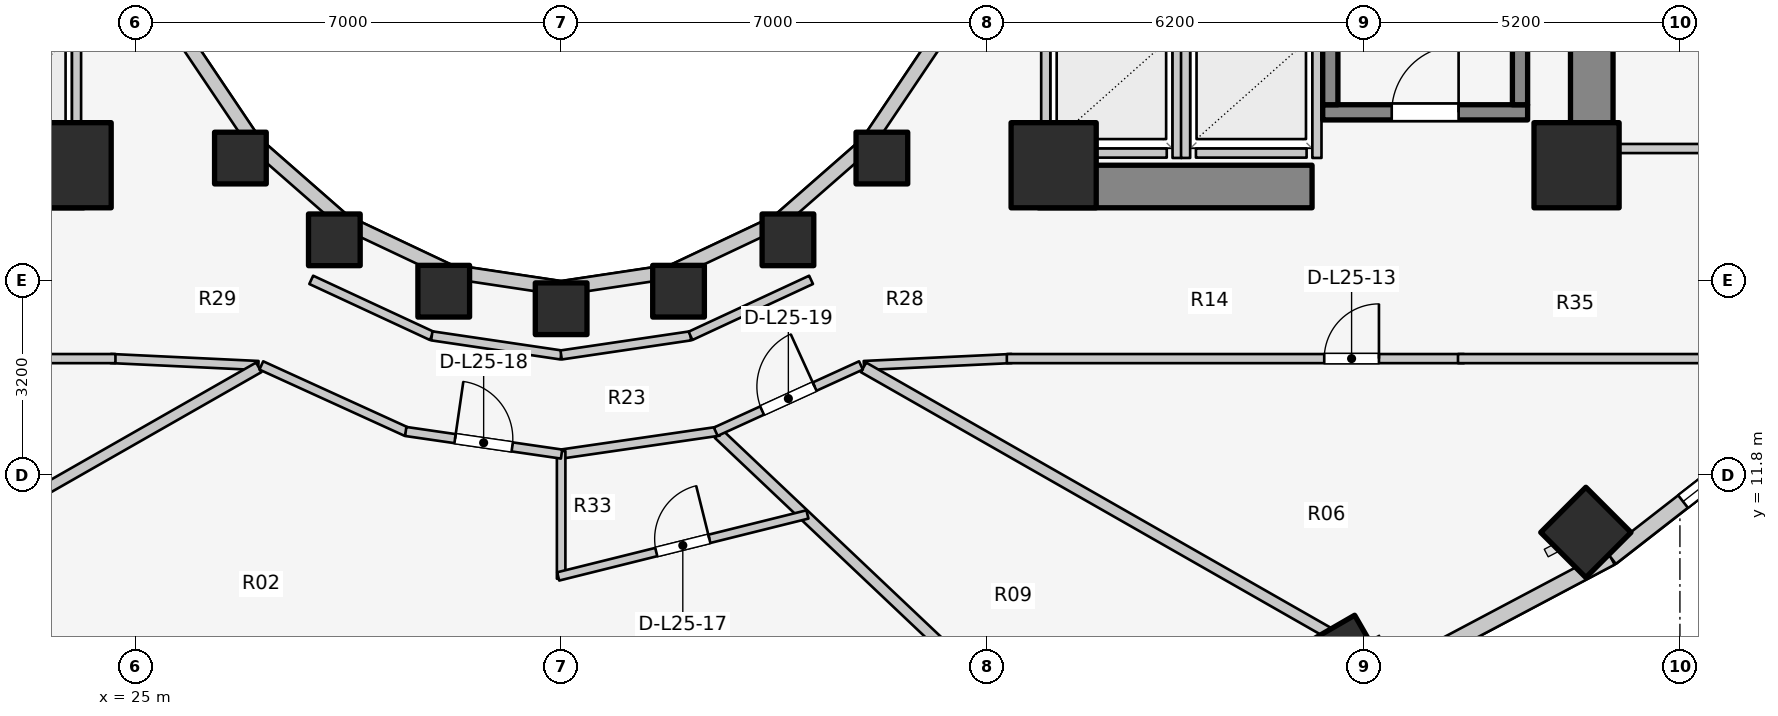
"""IFC4 building model, lengths in metres.
Left out: names, types, materials, properties, quantities, classifications, styles, units other than length and angle.
Written with IfcOpenShell. Run it as: python <this file> out.ifc"""

import sys

from ifc_helpers import new_model, si_unit, direction, frame, frame_2d, origin, origin_2d, place, context, subcontext, project, spatial, rectangle, extrude, element, fill, save


model = new_model("IFC4")
c1 = context("Model", 3, precision=1e-05, world=origin(), true_north=direction((0.0, 1.0)))
c2 = subcontext(c1, "Body", "Model", "MODEL_VIEW")
j1 = project(units=[si_unit("LENGTHUNIT", "METRE"), si_unit("PLANEANGLEUNIT", "RADIAN")], contexts=[c1])
p1 = place(None, origin())
s1 = spatial("IfcSite", under=j1, at=p1, CompositionType="ELEMENT")
p2 = place(p1, origin())
s2 = spatial("IfcBuilding", under=s1, at=p2, CompositionType="ELEMENT")
p3 = place(p2, frame((0.0, 0.0, 85.6)))
s3 = spatial("IfcBuildingStorey", under=s2, at=p3, CompositionType="ELEMENT", Elevation=85.6)
p4 = place(p3, frame((19.65, 16.55, 0.0), z_axis=(0.0, 0.0, 1.0), x_axis=(1.0, 0.0, 0.0)))
e1 = element("IfcWall", 1, at=p4, inside=s3, PredefinedType="SHEAR", context=c2, shape_type="SweptSolid", body=[
    extrude(rectangle(XDim=4.5, YDim=0.7, at=frame_2d((2.25, 0.0))), origin(), (0.0, 0.0, 1.0), 3.1),
])
p5 = place(p3, frame((48.95, 17.05, 0.0), z_axis=(0.0, 0.0, 1.0), x_axis=(0.0, 1.0, 0.0)))
e2 = element("IfcWall", 2, at=p5, inside=s3, PredefinedType="SHEAR", context=c2, shape_type="SweptSolid", body=[
    extrude(rectangle(XDim=12.8, YDim=0.7, at=frame_2d((6.4, 0.0))), origin(), (0.0, 0.0, 1.0), 3.1),
])
p6 = place(p3, frame((39.85, 16.55, 0.0), z_axis=(0.0, 0.0, 1.0), x_axis=(1.0, 0.0, 0.0)))
e3 = element("IfcWall", 3, at=p6, inside=s3, PredefinedType="SHEAR", context=c2, shape_type="SweptSolid", body=[
    extrude(rectangle(XDim=4.5, YDim=0.7, at=frame_2d((2.25, 0.0))), origin(), (0.0, 0.0, 1.0), 3.1),
])
p7 = place(p3, frame((44.525, 17.77, 0.0), z_axis=(0.0, 0.0, 1.0), x_axis=(1.0, 0.0, 0.0)))
e4 = element("IfcWall", 4, at=p7, inside=s3, PredefinedType="SOLIDWALL", context=c2, shape_type="SweptSolid", body=[
    extrude(rectangle(XDim=3.37, YDim=0.25, at=frame_2d((1.685, 0.0))), origin(), (0.0, 0.0, 1.0), 3.1),
])
p8 = place(p7, frame((1.135, 0.0, 0.0)))
e5 = element("IfcOpeningElement", 5, at=p8, cuts=e4, PredefinedType="OPENING", context=c2, shape_type="SweptSolid", body=[
    extrude(rectangle(XDim=1.1, YDim=2.1, at=frame_2d((0.55, 1.05))), frame((0.0, 0.135, 0.0), z_axis=(0.0, -1.0, 0.0), x_axis=(1.0, 0.0, 0.0)), (0.0, 0.0, 1.0), 0.27),
])
for number, where, z_axis, x_axis in (
    (6, (44.65, 17.895, 0.0), (0.0, 0.0, 1.0), (0.0, 1.0, 0.0)),
    (7, (47.77, 17.895, 0.0), (0.0, 0.0, 1.0), (0.0, 1.0, 0.0)),
):
    element("IfcWall", number, at=place(p3, frame(where, z_axis=z_axis, x_axis=x_axis)), inside=s3, PredefinedType="SOLIDWALL", context=c2, shape_type="SweptSolid", body=[
        extrude(rectangle(XDim=7.81, YDim=0.25, at=frame_2d((3.905, 0.0))), origin(), (0.0, 0.0, 1.0), 3.1),
    ])
for number, where, z_axis, x_axis in (
    (8, (23.9, 16.9, 0.0), (0.0, 0.0, 1.0), (1.0, 0.0, 0.0)),
    (9, (40.1, 16.9, 0.0), (0.0, 0.0, 1.0), (1.0, 0.0, 0.0)),
    (10, (48.7, 16.9, 0.0), (0.0, 0.0, 1.0), (1.0, 0.0, 0.0)),
):
    element("IfcColumn", number, at=place(p3, frame(where, z_axis=z_axis, x_axis=x_axis)), inside=s3, PredefinedType="COLUMN", context=c2, shape_type="SweptSolid", body=[
        extrude(rectangle(XDim=1.4, YDim=1.4, at=origin_2d()), origin(), (0.0, 0.0, 1.0), 3.1),
    ])
for number, where, z_axis, x_axis in (
    (11, (26.725, 17.018, 0.0), (0.0, 0.0, 1.0), (1.0, 0.0, 0.0)),
    (12, (28.27, 15.673, 0.0), (0.0, 0.0, 1.0), (1.0, 0.0, 0.0)),
    (13, (30.069, 14.828, 0.0), (0.0, 0.0, 1.0), (1.0, 0.0, 0.0)),
    (14, (32.0, 14.54, 0.0), (0.0, 0.0, 1.0), (1.0, 0.0, 0.0)),
    (15, (33.931, 14.828, 0.0), (0.0, 0.0, 1.0), (1.0, 0.0, 0.0)),
    (16, (35.73, 15.673, 0.0), (0.0, 0.0, 1.0), (1.0, 0.0, 0.0)),
):
    element("IfcColumn", number, at=place(p3, frame(where, z_axis=z_axis, x_axis=x_axis)), inside=s3, PredefinedType="COLUMN", context=c2, shape_type="SweptSolid", body=[
        extrude(rectangle(XDim=0.85, YDim=0.85, at=origin_2d()), origin(), (0.0, 0.0, 1.0), 3.1),
    ])
p9 = place(p3, frame((44.858, 8.782, 0.0), z_axis=(0.0, 0.0, 1.0), x_axis=(0.5, -0.866025403784, 0.0)))
e17 = element("IfcColumn", 17, at=p9, inside=s3, PredefinedType="COLUMN", context=c2, shape_type="SweptSolid", body=[
    extrude(rectangle(XDim=1.05, YDim=1.05, at=origin_2d()), origin(), (0.0, 0.0, 1.0), 3.1),
])
p10 = place(p3, frame((37.275, 17.018, 0.0), z_axis=(0.0, 0.0, 1.0), x_axis=(1.0, 0.0, 0.0)))
e18 = element("IfcColumn", 18, at=p10, inside=s3, PredefinedType="COLUMN", context=c2, shape_type="SweptSolid", body=[
    extrude(rectangle(XDim=0.85, YDim=0.85, at=origin_2d()), origin(), (0.0, 0.0, 1.0), 3.1),
])
p11 = place(p3, frame((48.853, 10.862, 0.0), z_axis=(0.0, 0.0, 1.0), x_axis=(0.707106781187, -0.707106781187, 0.0)))
e19 = element("IfcColumn", 19, at=p11, inside=s3, PredefinedType="COLUMN", context=c2, shape_type="SweptSolid", body=[
    extrude(rectangle(XDim=1.05, YDim=1.05, at=origin_2d()), origin(), (0.0, 0.0, 1.0), 3.1),
])
p12 = place(p3, frame((25.834, 18.94, 0.0), z_axis=(0.0, 0.0, 1.0), x_axis=(0.558197800898, -0.829707909492, 0.0)))
e20 = element("IfcWall", 20, at=p12, inside=s3, PredefinedType="STANDARD", context=c2, shape_type="SweptSolid", body=[
    extrude(rectangle(XDim=2.027, YDim=0.23, at=frame_2d((1.013, 0.0))), origin(), (0.0, 0.0, 1.0), 2.16),
])
p13 = place(p3, frame((26.965, 17.258, 0.0), z_axis=(0.0, 0.0, 1.0), x_axis=(0.752576694707, -0.658504607869, 0.0)))
e21 = element("IfcWall", 21, at=p13, inside=s3, PredefinedType="STANDARD", context=c2, shape_type="SweptSolid", body=[
    extrude(rectangle(XDim=1.959, YDim=0.23, at=frame_2d((0.98, 0.0))), origin(), (0.0, 0.0, 1.0), 2.16),
])
p14 = place(p3, frame((28.44, 15.968, 0.0), z_axis=(0.0, 0.0, 1.0), x_axis=(0.904179699603, -0.427152280606, 0.0)))
e22 = element("IfcWall", 22, at=p14, inside=s3, PredefinedType="STANDARD", context=c2, shape_type="SweptSolid", body=[
    extrude(rectangle(XDim=1.899, YDim=0.23, at=frame_2d((0.95, 0.0))), origin(), (0.0, 0.0, 1.0), 2.16),
])
for number, where, z_axis, x_axis in (
    (23, (30.157, 15.157, 0.0), (0.0, 0.0, 1.0), (0.989, -0.149, 0.0)),
    (24, (32.0, 14.88, 0.0), (0.0, 0.0, 1.0), (0.989, 0.149, 0.0)),
):
    element("IfcWall", number, at=place(p3, frame(where, z_axis=z_axis, x_axis=x_axis)), inside=s3, PredefinedType="STANDARD", context=c2, shape_type="SweptSolid", body=[
        extrude(rectangle(XDim=1.864, YDim=0.23, at=frame_2d((0.932, 0.0))), origin(), (0.0, 0.0, 1.0), 2.16),
    ])
p15 = place(p3, frame((33.843, 15.157, 0.0), z_axis=(0.0, 0.0, 1.0), x_axis=(0.904179699603, 0.427152280606, 0.0)))
e25 = element("IfcWall", 25, at=p15, inside=s3, PredefinedType="STANDARD", context=c2, shape_type="SweptSolid", body=[
    extrude(rectangle(XDim=1.899, YDim=0.23, at=frame_2d((0.95, 0.0))), origin(), (0.0, 0.0, 1.0), 2.16),
])
p16 = place(p3, frame((35.56, 15.968, 0.0), z_axis=(0.0, 0.0, 1.0), x_axis=(0.752576694707, 0.658504607869, 0.0)))
e26 = element("IfcWall", 26, at=p16, inside=s3, PredefinedType="STANDARD", context=c2, shape_type="SweptSolid", body=[
    extrude(rectangle(XDim=1.959, YDim=0.23, at=frame_2d((0.98, 0.0))), origin(), (0.0, 0.0, 1.0), 2.16),
])
p17 = place(p3, frame((37.035, 17.258, 0.0), z_axis=(0.0, 0.0, 1.0), x_axis=(0.558197800898, 0.829707909492, 0.0)))
e27 = element("IfcWall", 27, at=p17, inside=s3, PredefinedType="STANDARD", context=c2, shape_type="SweptSolid", body=[
    extrude(rectangle(XDim=2.027, YDim=0.23, at=frame_2d((1.013, 0.0))), origin(), (0.0, 0.0, 1.0), 2.16),
])
p18 = place(p3, frame((45.173, 8.279, 0.0), z_axis=(0.0, 0.0, 1.0), x_axis=(0.883668636807, 0.4681129568, 0.0)))
e28 = element("IfcWall", 28, at=p18, inside=s3, PredefinedType="STANDARD", context=c2, shape_type="SweptSolid", body=[
    extrude(rectangle(XDim=4.631, YDim=0.26, at=frame_2d((2.316, 0.0))), origin(), (0.0, 0.0, 1.0), 2.85),
])
p19 = place(p3, frame((49.266, 10.447, 0.0), z_axis=(0.0, 0.0, 1.0), x_axis=(0.789127449954, 0.614229491094, 0.0)))
e29 = element("IfcWall", 29, at=p19, inside=s3, PredefinedType="STANDARD", context=c2, shape_type="SweptSolid", body=[
    extrude(rectangle(XDim=4.505, YDim=0.26, at=frame_2d((2.252, 0.0))), origin(), (0.0, 0.0, 1.0), 2.85),
])
p20 = place(p19, frame((1.502, 0.0, 0.75)))
e30 = element("IfcOpeningElement", 30, at=p20, cuts=e29, PredefinedType="OPENING", context=c2, shape_type="SweptSolid", body=[
    extrude(rectangle(XDim=1.5, YDim=1.6, at=frame_2d((0.75, 0.8))), frame((0.0, 0.14, 0.0), z_axis=(0.0, -1.0, 0.0), x_axis=(1.0, 0.0, 0.0)), (0.0, 0.0, 1.0), 0.28),
])
p21 = place(p3, frame((22.04, 17.1, 0.0), z_axis=(0.0, 0.0, 1.0), x_axis=(1.0, 0.0, 0.0)))
e31 = element("IfcWall", 31, at=p21, inside=s3, PredefinedType="SOLIDWALL", context=c2, shape_type="SweptSolid", body=[
    extrude(rectangle(XDim=1.82, YDim=0.15, at=frame_2d((0.91, 0.0))), origin(), (0.0, 0.0, 1.0), 2.12),
])
p22 = place(p3, frame((24.03, 17.02, 0.0), z_axis=(0.0, 0.0, 1.0), x_axis=(0.0, 1.0, 0.0)))
e32 = element("IfcWall", 32, at=p22, inside=s3, PredefinedType="SOLIDWALL", context=c2, shape_type="SweptSolid", body=[
    extrude(rectangle(XDim=2.22, YDim=0.15, at=frame_2d((1.11, 0.0))), origin(), (0.0, 0.0, 1.0), 2.12),
])
p23 = place(p3, frame((40.14, 17.1, 0.0), z_axis=(0.0, 0.0, 1.0), x_axis=(1.0, 0.0, 0.0)))
e33 = element("IfcWall", 33, at=p23, inside=s3, PredefinedType="SOLIDWALL", context=c2, shape_type="SweptSolid", body=[
    extrude(rectangle(XDim=1.82, YDim=0.15, at=frame_2d((0.91, 0.0))), origin(), (0.0, 0.0, 1.0), 2.12),
])
p24 = place(p3, frame((39.97, 17.02, 0.0), z_axis=(0.0, 0.0, 1.0), x_axis=(0.0, 1.0, 0.0)))
e34 = element("IfcWall", 34, at=p24, inside=s3, PredefinedType="SOLIDWALL", context=c2, shape_type="SweptSolid", body=[
    extrude(rectangle(XDim=2.22, YDim=0.15, at=frame_2d((1.11, 0.0))), origin(), (0.0, 0.0, 1.0), 2.12),
])
p25 = place(p3, frame((42.13, 17.02, 0.0), z_axis=(0.0, 0.0, 1.0), x_axis=(0.0, 1.0, 0.0)))
e35 = element("IfcWall", 35, at=p25, inside=s3, PredefinedType="SOLIDWALL", context=c2, shape_type="SweptSolid", body=[
    extrude(rectangle(XDim=2.22, YDim=0.15, at=frame_2d((1.11, 0.0))), origin(), (0.0, 0.0, 1.0), 2.855),
])
p26 = place(p3, frame((42.44, 17.1, 0.0), z_axis=(0.0, 0.0, 1.0), x_axis=(1.0, 0.0, 0.0)))
e36 = element("IfcWall", 36, at=p26, inside=s3, PredefinedType="SOLIDWALL", context=c2, shape_type="SweptSolid", body=[
    extrude(rectangle(XDim=1.82, YDim=0.15, at=frame_2d((0.91, 0.0))), origin(), (0.0, 0.0, 1.0), 2.855),
])
p27 = place(p3, frame((42.27, 17.02, 0.0), z_axis=(0.0, 0.0, 1.0), x_axis=(0.0, 1.0, 0.0)))
e37 = element("IfcWall", 37, at=p27, inside=s3, PredefinedType="SOLIDWALL", context=c2, shape_type="SweptSolid", body=[
    extrude(rectangle(XDim=2.22, YDim=0.15, at=frame_2d((1.11, 0.0))), origin(), (0.0, 0.0, 1.0), 2.855),
])
p28 = place(p3, frame((44.43, 17.02, 0.0), z_axis=(0.0, 0.0, 1.0), x_axis=(0.0, 1.0, 0.0)))
e38 = element("IfcWall", 38, at=p28, inside=s3, PredefinedType="SOLIDWALL", context=c2, shape_type="SweptSolid", body=[
    extrude(rectangle(XDim=2.22, YDim=0.15, at=frame_2d((1.11, 0.0))), origin(), (0.0, 0.0, 1.0), 2.12),
])
p29 = place(p3, frame((27.89, 15.015, 0.0), z_axis=(0.0, 0.0, 1.0), x_axis=(0.906943449489, -0.421252393975, 0.0)))
e39 = element("IfcWall", 39, at=p29, inside=s3, PredefinedType="PARTITIONING", context=c2, shape_type="SweptSolid", body=[
    extrude(rectangle(XDim=2.186, YDim=0.15, at=frame_2d((1.093, 0.0))), origin(), (0.0, 0.0, 1.0), 2.272),
])
for number, where, z_axis, x_axis in (
    (40, (29.873, 14.094, 0.0), (0.0, 0.0, 1.0), (0.989, -0.146, 0.0)),
    (41, (32.0, 13.78, 0.0), (0.0, 0.0, 1.0), (0.989, 0.146, 0.0)),
):
    element("IfcWall", number, at=place(p3, frame(where, z_axis=z_axis, x_axis=x_axis)), inside=s3, PredefinedType="PARTITIONING", context=c2, shape_type="SweptSolid", body=[
        extrude(rectangle(XDim=2.151, YDim=0.15, at=frame_2d((1.075, 0.0))), origin(), (0.0, 0.0, 1.0), 2.272),
    ])
p30 = place(p3, frame((34.127, 14.094, 0.0), z_axis=(0.0, 0.0, 1.0), x_axis=(0.906943449489, 0.421252393975, 0.0)))
e42 = element("IfcWall", 42, at=p30, inside=s3, PredefinedType="PARTITIONING", context=c2, shape_type="SweptSolid", body=[
    extrude(rectangle(XDim=2.186, YDim=0.15, at=frame_2d((1.093, 0.0))), origin(), (0.0, 0.0, 1.0), 2.272),
])
p31 = place(p3, frame((48.95, 17.175, 0.0), z_axis=(0.0, 0.0, 1.0), x_axis=(1.0, 0.0, 0.0)))
e43 = element("IfcWall", 43, at=p31, inside=s3, PredefinedType="PARTITIONING", context=c2, shape_type="SweptSolid", body=[
    extrude(rectangle(XDim=6.492, YDim=0.15, at=frame_2d((3.246, 0.0))), origin(), (0.0, 0.0, 1.0), 2.855),
])
p32 = place(p31, frame((2.948, 0.0, 0.0)))
e44 = element("IfcOpeningElement", 44, at=p32, cuts=e43, PredefinedType="OPENING", context=c2, shape_type="SweptSolid", body=[
    extrude(rectangle(XDim=0.95, YDim=2.1, at=frame_2d((0.475, 1.05))), frame((0.0, 0.085, 0.0), z_axis=(0.0, -1.0, 0.0), x_axis=(1.0, 0.0, 0.0)), (0.0, 0.0, 1.0), 0.17),
])
p33 = place(p3, frame((27.02, 13.606, 0.0), z_axis=(0.0, 0.0, 1.0), x_axis=(-0.998877427952, 0.047369651964, 0.0)))
e45 = element("IfcWall", 45, at=p33, inside=s3, PredefinedType="PARTITIONING", context=c2, shape_type="SweptSolid", body=[
    extrude(rectangle(XDim=2.433, YDim=0.15, at=frame_2d((1.216, 0.0))), origin(), (0.0, 0.0, 1.0), 2.272),
])
p34 = place(p3, frame((17.15, 13.72, 0.0), z_axis=(0.0, 0.0, 1.0), x_axis=(1.0, 0.0, 0.0)))
e46 = element("IfcWall", 46, at=p34, inside=s3, PredefinedType="PARTITIONING", context=c2, shape_type="SweptSolid", body=[
    extrude(rectangle(XDim=7.52, YDim=0.15, at=frame_2d((3.76, 0.0))), origin(), (0.0, 0.0, 1.0), 2.272),
])
p35 = place(p34, frame((1.3, 0.0, 0.0)))
e47 = element("IfcOpeningElement", 47, at=p35, cuts=e46, PredefinedType="OPENING", context=c2, shape_type="SweptSolid", body=[
    extrude(rectangle(XDim=0.9, YDim=2.1, at=frame_2d((0.45, 1.05))), frame((0.0, 0.085, 0.0), z_axis=(0.0, -1.0, 0.0), x_axis=(1.0, 0.0, 0.0)), (0.0, 0.0, 1.0), 0.17),
])
p36 = place(p3, frame((36.98, 13.606, 0.0), z_axis=(0.0, 0.0, 1.0), x_axis=(0.998877427952, 0.047369651964, 0.0)))
e48 = element("IfcWall", 48, at=p36, inside=s3, PredefinedType="PARTITIONING", context=c2, shape_type="SweptSolid", body=[
    extrude(rectangle(XDim=2.433, YDim=0.15, at=frame_2d((1.216, 0.0))), origin(), (0.0, 0.0, 1.0), 2.272),
])
p37 = place(p3, frame((39.33, 13.72, 0.0), z_axis=(0.0, 0.0, 1.0), x_axis=(1.0, 0.0, 0.0)))
e49 = element("IfcWall", 49, at=p37, inside=s3, PredefinedType="PARTITIONING", context=c2, shape_type="SweptSolid", body=[
    extrude(rectangle(XDim=7.52, YDim=0.15, at=frame_2d((3.76, 0.0))), origin(), (0.0, 0.0, 1.0), 2.272),
])
p38 = place(p37, frame((5.22, 0.0, 0.0)))
e50 = element("IfcOpeningElement", 50, at=p38, cuts=e49, PredefinedType="OPENING", context=c2, shape_type="SweptSolid", body=[
    extrude(rectangle(XDim=0.9, YDim=2.1, at=frame_2d((0.45, 1.05))), frame((0.0, 0.085, 0.0), z_axis=(0.0, -1.0, 0.0), x_axis=(1.0, 0.0, 0.0)), (0.0, 0.0, 1.0), 0.17),
])
p39 = place(p3, frame((46.75, 13.72, 0.0), z_axis=(0.0, 0.0, 1.0), x_axis=(1.0, 0.0, 0.0)))
e51 = element("IfcWall", 51, at=p39, inside=s3, PredefinedType="PARTITIONING", context=c2, shape_type="SweptSolid", body=[
    extrude(rectangle(XDim=5.05, YDim=0.15, at=frame_2d((2.525, 0.0))), origin(), (0.0, 0.0, 1.0), 2.142),
])
p40 = place(p3, frame((27.027, 13.576, 0.0), z_axis=(0.0, 0.0, 1.0), x_axis=(-0.868484076301, -0.495717065685, 0.0)))
e52 = element("IfcWall", 52, at=p40, inside=s3, PredefinedType="PARTITIONING", context=c2, shape_type="SweptSolid", body=[
    extrude(rectangle(XDim=8.789, YDim=0.18, at=frame_2d((4.394, 0.0))), origin(), (0.0, 0.0, 1.0), 2.272),
])
p41 = place(p3, frame((34.589, 12.482, 0.0), z_axis=(0.0, 0.0, 1.0), x_axis=(0.726306601605, -0.687370875485, 0.0)))
e53 = element("IfcWall", 53, at=p41, inside=s3, PredefinedType="PARTITIONING", context=c2, shape_type="SweptSolid", body=[
    extrude(rectangle(XDim=6.76, YDim=0.18, at=frame_2d((3.38, 0.0))), origin(), (0.0, 0.0, 1.0), 2.272),
])
p42 = place(p3, frame((36.973, 13.576, 0.0), z_axis=(0.0, 0.0, 1.0), x_axis=(0.868484076301, -0.495717065685, 0.0)))
e54 = element("IfcWall", 54, at=p42, inside=s3, PredefinedType="PARTITIONING", context=c2, shape_type="SweptSolid", body=[
    extrude(rectangle(XDim=8.789, YDim=0.18, at=frame_2d((4.394, 0.0))), origin(), (0.0, 0.0, 1.0), 2.272),
])
p43 = place(p3, frame((31.95, 12.143, 0.0), z_axis=(0.0, 0.0, 1.0), x_axis=(0.989649898776, 0.143502884474, 0.0)))
e55 = element("IfcWall", 55, at=p43, inside=s3, PredefinedType="PARTITIONING", context=c2, shape_type="SweptSolid", body=[
    extrude(rectangle(XDim=2.676, YDim=0.15, at=frame_2d((1.338, 0.0))), origin(), (0.0, 0.0, 1.0), 2.272),
])
p44 = place(p3, frame((32.0, 12.2, 0.0), z_axis=(0.0, 0.0, 1.0), x_axis=(0.0, -1.0, 0.0)))
e56 = element("IfcWall", 56, at=p44, inside=s3, PredefinedType="PLUMBINGWALL", context=c2, shape_type="SweptSolid", body=[
    extrude(rectangle(XDim=2.1, YDim=0.14, at=frame_2d((1.05, 0.0))), origin(), (0.0, 0.0, 1.0), 2.272),
])
p45 = place(p3, frame((31.951, 10.138, 0.0), z_axis=(0.0, 0.0, 1.0), x_axis=(0.970461257599, 0.241257015439, 0.0)))
e57 = element("IfcWall", 57, at=p45, inside=s3, PredefinedType="PLUMBINGWALL", context=c2, shape_type="SweptSolid", body=[
    extrude(rectangle(XDim=4.224, YDim=0.14, at=frame_2d((2.112, 0.0))), origin(), (0.0, 0.0, 1.0), 2.272),
])
p46 = place(p45, frame((1.662, 0.0, 0.0)))
e58 = element("IfcOpeningElement", 58, at=p46, cuts=e57, PredefinedType="OPENING", context=c2, shape_type="SweptSolid", body=[
    extrude(rectangle(XDim=0.9, YDim=2.1, at=frame_2d((0.45, 1.05))), frame((0.0, 0.08, 0.0), z_axis=(0.0, -1.0, 0.0), x_axis=(1.0, 0.0, 0.0)), (0.0, 0.0, 1.0), 0.16),
])
p47 = place(p3, frame((27.069, 13.607, 0.0), z_axis=(0.0, 0.0, 1.0), x_axis=(0.909747571199, -0.415161843982, 0.0)))
e59 = element("IfcWall", 59, at=p47, inside=s3, PredefinedType="PARTITIONING", context=c2, shape_type="SweptSolid", body=[
    extrude(rectangle(XDim=2.625, YDim=0.15, at=frame_2d((1.312, 0.0))), origin(), (0.0, 0.0, 1.0), 2.272),
])
p48 = place(p3, frame((29.444, 12.522, 0.0), z_axis=(0.0, 0.0, 1.0), x_axis=(0.989637894688, -0.143585644814, 0.0)))
e60 = element("IfcWall", 60, at=p48, inside=s3, PredefinedType="PARTITIONING", context=c2, shape_type="SweptSolid", body=[
    extrude(rectangle(XDim=2.59, YDim=0.15, at=frame_2d((1.295, 0.0))), origin(), (0.0, 0.0, 1.0), 2.272),
])
p49 = place(p48, frame((0.82, 0.0, 0.0)))
e61 = element("IfcOpeningElement", 61, at=p49, cuts=e60, PredefinedType="OPENING", context=c2, shape_type="SweptSolid", body=[
    extrude(rectangle(XDim=0.95, YDim=2.1, at=frame_2d((0.475, 1.05))), frame((0.0, 0.085, 0.0), z_axis=(0.0, -1.0, 0.0), x_axis=(1.0, 0.0, 0.0)), (0.0, 0.0, 1.0), 0.17),
])
p50 = place(p3, frame((34.543, 12.518, 0.0), z_axis=(0.0, 0.0, 1.0), x_axis=(0.909747571199, 0.415161843982, 0.0)))
e62 = element("IfcWall", 62, at=p50, inside=s3, PredefinedType="PARTITIONING", context=c2, shape_type="SweptSolid", body=[
    extrude(rectangle(XDim=2.625, YDim=0.15, at=frame_2d((1.312, 0.0))), origin(), (0.0, 0.0, 1.0), 2.272),
])
p51 = place(p50, frame((0.838, 0.0, 0.0)))
e63 = element("IfcOpeningElement", 63, at=p51, cuts=e62, PredefinedType="OPENING", context=c2, shape_type="SweptSolid", body=[
    extrude(rectangle(XDim=0.95, YDim=2.1, at=frame_2d((0.475, 1.05))), frame((0.0, 0.085, 0.0), z_axis=(0.0, -1.0, 0.0), x_axis=(1.0, 0.0, 0.0)), (0.0, 0.0, 1.0), 0.17),
])
p52 = place(p20, origin())
e64 = element("IfcWindow", 64, at=p52, inside=s3, PartitioningType="SINGLE_PANEL", PredefinedType="WINDOW", context=c2, shape_type="SweptSolid", body=[
    extrude(rectangle(XDim=1.5, YDim=1.6, at=frame_2d((0.75, 0.8))), frame((0.0, 0.03, 0.0), z_axis=(0.0, -1.0, 0.0), x_axis=(1.0, 0.0, 0.0)), (0.0, 0.0, 1.0), 0.06),
])
fill(e30, e64)
p53 = place(p8, origin())
e65 = element("IfcDoor", 65, at=p53, inside=s3, OperationType="SINGLE_SWING_RIGHT", PredefinedType="DOOR", context=c2, shape_type="SweptSolid", body=[
    extrude(rectangle(XDim=1.1, YDim=2.1, at=frame_2d((0.55, 1.05))), frame((0.0, 0.025, 0.0), z_axis=(0.0, -1.0, 0.0), x_axis=(1.0, 0.0, 0.0)), (0.0, 0.0, 1.0), 0.05),
])
fill(e5, e65)
p54 = place(p38, origin())
e66 = element("IfcDoor", 66, at=p54, inside=s3, OperationType="SINGLE_SWING_RIGHT", PredefinedType="DOOR", context=c2, shape_type="SweptSolid", body=[
    extrude(rectangle(XDim=0.9, YDim=2.1, at=frame_2d((0.45, 1.05))), frame((0.0, 0.025, 0.0), z_axis=(0.0, -1.0, 0.0), x_axis=(1.0, 0.0, 0.0)), (0.0, 0.0, 1.0), 0.05),
])
fill(e50, e66)
p55 = place(p46, origin())
e67 = element("IfcDoor", 67, at=p55, inside=s3, OperationType="SINGLE_SWING_RIGHT", PredefinedType="DOOR", context=c2, shape_type="SweptSolid", body=[
    extrude(rectangle(XDim=0.9, YDim=2.1, at=frame_2d((0.45, 1.05))), frame((0.0, 0.025, 0.0), z_axis=(0.0, -1.0, 0.0), x_axis=(1.0, 0.0, 0.0)), (0.0, 0.0, 1.0), 0.05),
])
fill(e58, e67)
p56 = place(p49, origin())
e68 = element("IfcDoor", 68, at=p56, inside=s3, OperationType="SINGLE_SWING_LEFT", PredefinedType="DOOR", context=c2, shape_type="SweptSolid", body=[
    extrude(rectangle(XDim=0.95, YDim=2.1, at=frame_2d((0.475, 1.05))), frame((0.0, 0.025, 0.0), z_axis=(0.0, -1.0, 0.0), x_axis=(1.0, 0.0, 0.0)), (0.0, 0.0, 1.0), 0.05),
])
fill(e61, e68)
p57 = place(p51, origin())
e69 = element("IfcDoor", 69, at=p57, inside=s3, OperationType="SINGLE_SWING_RIGHT", PredefinedType="DOOR", context=c2, shape_type="SweptSolid", body=[
    extrude(rectangle(XDim=0.95, YDim=2.1, at=frame_2d((0.475, 1.05))), frame((0.0, 0.025, 0.0), z_axis=(0.0, -1.0, 0.0), x_axis=(1.0, 0.0, 0.0)), (0.0, 0.0, 1.0), 0.05),
])
fill(e63, e69)
save(model, sys.argv[1])
